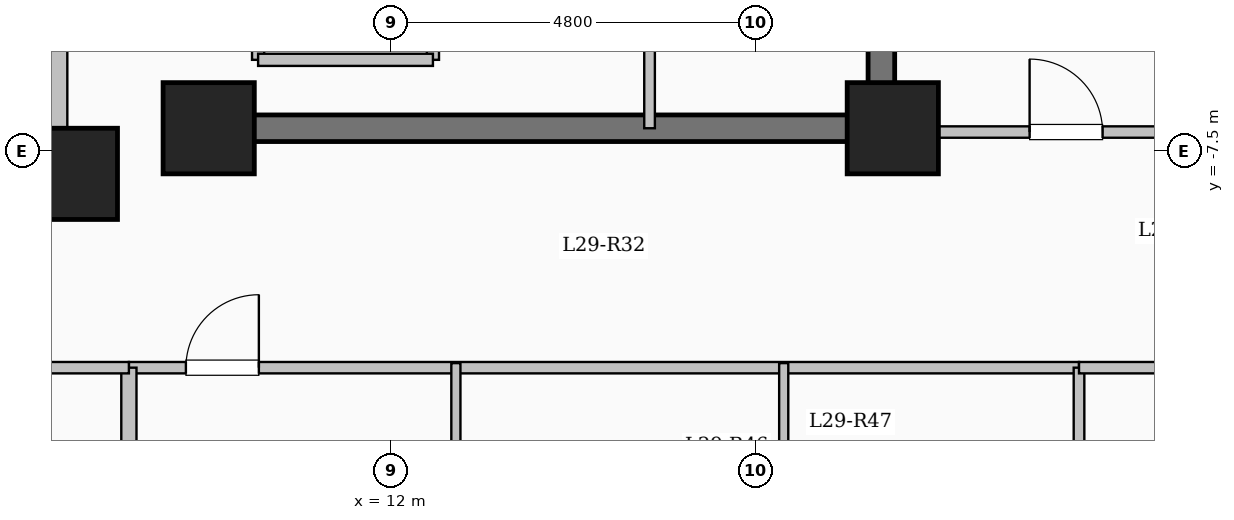
"""IFC4 building model, lengths in metres.
Left out: names, types, materials, properties, quantities, classifications, styles, units other than length and angle.
Written with IfcOpenShell. Run it as: python <this file> out.ifc"""

import sys

from ifc_helpers import new_model, si_unit, direction, frame, frame_2d, origin, origin_2d, place, context, subcontext, project, spatial, rectangle, extrude, element, fill, save


model = new_model("IFC4")
c1 = context("Model", 3, precision=1e-05, world=origin(), true_north=direction((0.0, 1.0)))
c2 = subcontext(c1, "Body", "Model", "MODEL_VIEW")
j1 = project(units=[si_unit("LENGTHUNIT", "METRE"), si_unit("PLANEANGLEUNIT", "RADIAN")], contexts=[c1])
p1 = place(None, origin())
s1 = spatial("IfcSite", under=j1, at=p1, CompositionType="ELEMENT")
p2 = place(p1, origin())
s2 = spatial("IfcBuilding", under=s1, at=p2, CompositionType="ELEMENT")
p3 = place(p2, frame((0.0, 0.0, 108.45)))
s3 = spatial("IfcBuildingStorey", under=s2, at=p3, CompositionType="ELEMENT", Elevation=108.45)
for number, where, z_axis, x_axis in (
    (1, (7.8, -7.8, 0.0), (0.0, 0.0, 1.0), (1.0, 0.0, 0.0)),
    (2, (9.6, -7.2, 0.0), (0.0, 0.0, 1.0), (1.0, 0.0, 0.0)),
    (3, (18.6, -7.2, 0.0), (0.0, 0.0, 1.0), (1.0, 0.0, 0.0)),
):
    element("IfcColumn", number, at=place(p3, frame(where, z_axis=z_axis, x_axis=x_axis)), inside=s3, PredefinedType="COLUMN", context=c2, shape_type="SweptSolid", body=[
        extrude(rectangle(XDim=1.2, YDim=1.2, at=origin_2d()), origin(), (0.0, 0.0, 1.0), 3.35),
    ])
p4 = place(p3, frame((-7.62, -7.62, 0.0), z_axis=(0.0, 0.0, 1.0), x_axis=(1.0, 0.0, 0.0)))
e4 = element("IfcWall", 4, at=p4, inside=s3, PredefinedType="SOLIDWALL", context=c2, shape_type="SweptSolid", body=[
    extrude(rectangle(XDim=15.24, YDim=0.24, at=frame_2d((7.62, 0.0))), origin(), (0.0, 0.0, 1.0), 3.1),
])
p5 = place(p4, frame((6.92, 0.0, 0.95)))
e5 = element("IfcOpeningElement", 5, at=p5, cuts=e4, PredefinedType="OPENING", context=c2, shape_type="SweptSolid", body=[
    extrude(rectangle(XDim=1.4, YDim=1.5, at=frame_2d((0.7, 0.75))), frame((0.0, 0.13, 0.0), z_axis=(0.0, -1.0, 0.0), x_axis=(1.0, 0.0, 0.0)), (0.0, 0.0, 1.0), 0.26),
])
p6 = place(p3, frame((7.62, -7.62, 0.0), z_axis=(0.0, 0.0, 1.0), x_axis=(0.0, 1.0, 0.0)))
e6 = element("IfcWall", 6, at=p6, inside=s3, PredefinedType="SOLIDWALL", context=c2, shape_type="SweptSolid", body=[
    extrude(rectangle(XDim=15.24, YDim=0.24, at=frame_2d((7.62, 0.0))), origin(), (0.0, 0.0, 1.0), 3.1),
])
p7 = place(p6, frame((6.92, 0.0, 0.95)))
e7 = element("IfcOpeningElement", 7, at=p7, cuts=e6, PredefinedType="OPENING", context=c2, shape_type="SweptSolid", body=[
    extrude(rectangle(XDim=1.4, YDim=1.5, at=frame_2d((0.7, 0.75))), frame((0.0, 0.13, 0.0), z_axis=(0.0, -1.0, 0.0), x_axis=(1.0, 0.0, 0.0)), (0.0, 0.0, 1.0), 0.26),
])
p8 = place(p3, frame((10.25, -6.3, 0.0), z_axis=(0.0, 0.0, 1.0), x_axis=(0.0, 1.0, 0.0)))
e8 = element("IfcWall", 8, at=p8, inside=s3, PredefinedType="SOLIDWALL", context=c2, shape_type="SweptSolid", body=[
    extrude(rectangle(XDim=2.6, YDim=0.16, at=frame_2d((1.3, 0.0))), origin(), (0.0, 0.0, 1.0), 3.1),
])
p9 = place(p8, frame((0.75, 0.0, 0.0)))
e9 = element("IfcOpeningElement", 9, at=p9, cuts=e8, PredefinedType="OPENING", context=c2, shape_type="SweptSolid", body=[
    extrude(rectangle(XDim=1.1, YDim=2.15, at=frame_2d((0.55, 1.075))), frame((0.0, 0.09, 0.0), z_axis=(0.0, -1.0, 0.0), x_axis=(1.0, 0.0, 0.0)), (0.0, 0.0, 1.0), 0.18),
])
p10 = place(p3, frame((12.55, -6.3, 0.0), z_axis=(0.0, 0.0, 1.0), x_axis=(0.0, 1.0, 0.0)))
e10 = element("IfcWall", 10, at=p10, inside=s3, PredefinedType="SOLIDWALL", context=c2, shape_type="SweptSolid", body=[
    extrude(rectangle(XDim=2.6, YDim=0.16, at=frame_2d((1.3, 0.0))), origin(), (0.0, 0.0, 1.0), 3.1),
])
p11 = place(p3, frame((10.25, -6.3, 0.0), z_axis=(0.0, 0.0, 1.0), x_axis=(1.0, 0.0, 0.0)))
e11 = element("IfcWall", 11, at=p11, inside=s3, PredefinedType="SOLIDWALL", context=c2, shape_type="SweptSolid", body=[
    extrude(rectangle(XDim=2.3, YDim=0.16, at=frame_2d((1.15, 0.0))), origin(), (0.0, 0.0, 1.0), 3.1),
])
p12 = place(p3, frame((18.45, -7.375, 0.0), z_axis=(0.0, 0.0, 1.0), x_axis=(0.0, 1.0, 0.0)))
e12 = element("IfcWall", 12, at=p12, inside=s3, PredefinedType="SHEAR", context=c2, shape_type="SweptSolid", body=[
    extrude(rectangle(XDim=14.05, YDim=0.35, at=frame_2d((7.025, 0.0))), origin(), (0.0, 0.0, 1.0), 3.35),
])
p13 = place(p3, frame((10.075, -7.2, 0.0), z_axis=(0.0, 0.0, 1.0), x_axis=(1.0, 0.0, 0.0)))
e13 = element("IfcWall", 13, at=p13, inside=s3, PredefinedType="SHEAR", context=c2, shape_type="SweptSolid", body=[
    extrude(rectangle(XDim=8.55, YDim=0.35, at=frame_2d((4.275, 0.0))), origin(), (0.0, 0.0, 1.0), 3.35),
])
p14 = place(p3, frame((15.4, -7.2, 0.0), z_axis=(0.0, 0.0, 1.0), x_axis=(0.0, 1.0, 0.0)))
e14 = element("IfcWall", 14, at=p14, inside=s3, PredefinedType="PARTITIONING", context=c2, shape_type="SweptSolid", body=[
    extrude(rectangle(XDim=10.45, YDim=0.14, at=frame_2d((5.225, 0.0))), origin(), (0.0, 0.0, 1.0), 3.1),
])
p15 = place(p14, frame((9.25, 0.0, 0.0)))
e15 = element("IfcOpeningElement", 15, at=p15, cuts=e14, PredefinedType="OPENING", context=c2, shape_type="SweptSolid", body=[
    extrude(rectangle(XDim=0.9, YDim=2.08, at=frame_2d((0.45, 1.04))), frame((0.0, 0.08, 0.0), z_axis=(0.0, -1.0, 0.0), x_axis=(1.0, 0.0, 0.0)), (0.0, 0.0, 1.0), 0.16),
])
p16 = place(p3, frame((8.55, -10.35, 0.0), z_axis=(0.0, 0.0, 1.0), x_axis=(1.0, 0.0, 0.0)))
e16 = element("IfcWall", 16, at=p16, inside=s3, PredefinedType="PARTITIONING", context=c2, shape_type="SweptSolid", body=[
    extrude(rectangle(XDim=12.5, YDim=0.15, at=frame_2d((6.25, 0.0))), origin(), (0.0, 0.0, 1.0), 3.1),
])
p17 = place(p16, frame((0.75, 0.0, 0.0)))
e17 = element("IfcOpeningElement", 17, at=p17, cuts=e16, PredefinedType="OPENING", context=c2, shape_type="SweptSolid", body=[
    extrude(rectangle(XDim=0.96, YDim=2.15, at=frame_2d((0.48, 1.075))), frame((0.0, 0.085, 0.0), z_axis=(0.0, -1.0, 0.0), x_axis=(1.0, 0.0, 0.0)), (0.0, 0.0, 1.0), 0.17),
])
p18 = place(p3, frame((12.852, -22.1, 0.0), z_axis=(0.0, 0.0, 1.0), x_axis=(0.0, 1.0, 0.0)))
e18 = element("IfcWall", 18, at=p18, inside=s3, PredefinedType="PARTITIONING", context=c2, shape_type="SweptSolid", body=[
    extrude(rectangle(XDim=11.81, YDim=0.12, at=frame_2d((5.905, 0.0))), origin(), (0.0, 0.0, 1.0), 3.1),
])
p19 = place(p18, frame((7.815, 0.0, 0.0)))
e19 = element("IfcOpeningElement", 19, at=p19, cuts=e18, PredefinedType="OPENING", context=c2, shape_type="SweptSolid", body=[
    extrude(rectangle(XDim=1.08, YDim=2.15, at=frame_2d((0.54, 1.075))), frame((0.0, 0.07, 0.0), z_axis=(0.0, -1.0, 0.0), x_axis=(1.0, 0.0, 0.0)), (0.0, 0.0, 1.0), 0.14),
])
p20 = place(p3, frame((17.165, -12.92, 0.0), z_axis=(0.0, 0.0, 1.0), x_axis=(0.0, 1.0, 0.0)))
e20 = element("IfcWall", 20, at=p20, inside=s3, PredefinedType="PARTITIONING", context=c2, shape_type="SweptSolid", body=[
    extrude(rectangle(XDim=2.63, YDim=0.12, at=frame_2d((1.315, 0.0))), origin(), (0.0, 0.0, 1.0), 3.1),
])
p21 = place(p3, frame((8.55, -22.704, 0.0), z_axis=(0.0, 0.0, 1.0), x_axis=(0.0, 1.0, 0.0)))
e21 = element("IfcWall", 21, at=p21, inside=s3, PredefinedType="SOLIDWALL", context=c2, shape_type="SweptSolid", body=[
    extrude(rectangle(XDim=12.354, YDim=0.2, at=frame_2d((6.177, 0.0))), origin(), (0.0, 0.0, 1.0), 3.1),
])
p22 = place(p3, frame((-8.55, -10.35, 0.0), z_axis=(0.0, 0.0, 1.0), x_axis=(1.0, 0.0, 0.0)))
e22 = element("IfcWall", 22, at=p22, inside=s3, PredefinedType="PARTITIONING", context=c2, shape_type="SweptSolid", body=[
    extrude(rectangle(XDim=17.1, YDim=0.15, at=frame_2d((8.55, 0.0))), origin(), (0.0, 0.0, 1.0), 3.1),
])
p23 = place(p22, frame((1.6, 0.0, 0.0)))
e23 = element("IfcOpeningElement", 23, at=p23, cuts=e22, PredefinedType="OPENING", context=c2, shape_type="SweptSolid", body=[
    extrude(rectangle(XDim=0.95, YDim=2.15, at=frame_2d((0.475, 1.075))), frame((0.0, 0.085, 0.0), z_axis=(0.0, -1.0, 0.0), x_axis=(1.0, 0.0, 0.0)), (0.0, 0.0, 1.0), 0.17),
])
p24 = place(p22, frame((10.5, 0.0, 0.0)))
e24 = element("IfcOpeningElement", 24, at=p24, cuts=e22, PredefinedType="OPENING", context=c2, shape_type="SweptSolid", body=[
    extrude(rectangle(XDim=0.95, YDim=2.15, at=frame_2d((0.475, 1.075))), frame((0.0, 0.085, 0.0), z_axis=(0.0, -1.0, 0.0), x_axis=(1.0, 0.0, 0.0)), (0.0, 0.0, 1.0), 0.17),
])
p25 = place(p3, frame((18.45, -7.25, 0.0), z_axis=(0.0, 0.0, 1.0), x_axis=(1.0, 0.0, 0.0)))
e25 = element("IfcWall", 25, at=p25, inside=s3, PredefinedType="PARTITIONING", context=c2, shape_type="SweptSolid", body=[
    extrude(rectangle(XDim=8.43, YDim=0.15, at=frame_2d((4.215, 0.0))), origin(), (0.0, 0.0, 1.0), 3.1),
])
p26 = place(p25, frame((1.95, 0.0, 0.0)))
e26 = element("IfcOpeningElement", 26, at=p26, cuts=e25, PredefinedType="OPENING", context=c2, shape_type="SweptSolid", body=[
    extrude(rectangle(XDim=0.96, YDim=2.15, at=frame_2d((0.48, 1.075))), frame((0.0, 0.085, 0.0), z_axis=(0.0, -1.0, 0.0), x_axis=(1.0, 0.0, 0.0)), (0.0, 0.0, 1.0), 0.17),
])
p27 = place(p3, frame((21.05, -17.85, 0.0), z_axis=(0.0, 0.0, 1.0), x_axis=(0.0, 1.0, 0.0)))
e27 = element("IfcWall", 27, at=p27, inside=s3, PredefinedType="PARTITIONING", context=c2, shape_type="SweptSolid", body=[
    extrude(rectangle(XDim=7.5, YDim=0.14, at=frame_2d((3.75, 0.0))), origin(), (0.0, 0.0, 1.0), 3.1),
])
p28 = place(p3, frame((21.05, -10.35, 0.0), z_axis=(0.0, 0.0, 1.0), x_axis=(1.0, 0.0, 0.0)))
e28 = element("IfcWall", 28, at=p28, inside=s3, PredefinedType="PARTITIONING", context=c2, shape_type="SweptSolid", body=[
    extrude(rectangle(XDim=5.83, YDim=0.15, at=frame_2d((2.915, 0.0))), origin(), (0.0, 0.0, 1.0), 3.1),
])
p29 = place(p28, frame((2.44, 0.0, 0.0)))
e29 = element("IfcOpeningElement", 29, at=p29, cuts=e28, PredefinedType="OPENING", context=c2, shape_type="SweptSolid", body=[
    extrude(rectangle(XDim=0.95, YDim=2.15, at=frame_2d((0.475, 1.075))), frame((0.0, 0.085, 0.0), z_axis=(0.0, -1.0, 0.0), x_axis=(1.0, 0.0, 0.0)), (0.0, 0.0, 1.0), 0.17),
])
p30 = place(p17, origin())
e30 = element("IfcDoor", 30, at=p30, inside=s3, OperationType="SINGLE_SWING_RIGHT", PredefinedType="DOOR", context=c2, shape_type="SweptSolid", body=[
    extrude(rectangle(XDim=0.96, YDim=2.15, at=frame_2d((0.48, 1.075))), frame((0.0, 0.025, 0.0), z_axis=(0.0, -1.0, 0.0), x_axis=(1.0, 0.0, 0.0)), (0.0, 0.0, 1.0), 0.05),
])
fill(e17, e30)
p31 = place(p26, origin())
e31 = element("IfcDoor", 31, at=p31, inside=s3, OperationType="SINGLE_SWING_LEFT", PredefinedType="DOOR", context=c2, shape_type="SweptSolid", body=[
    extrude(rectangle(XDim=0.96, YDim=2.15, at=frame_2d((0.48, 1.075))), frame((0.0, 0.025, 0.0), z_axis=(0.0, -1.0, 0.0), x_axis=(1.0, 0.0, 0.0)), (0.0, 0.0, 1.0), 0.05),
])
fill(e26, e31)
save(model, sys.argv[1])
